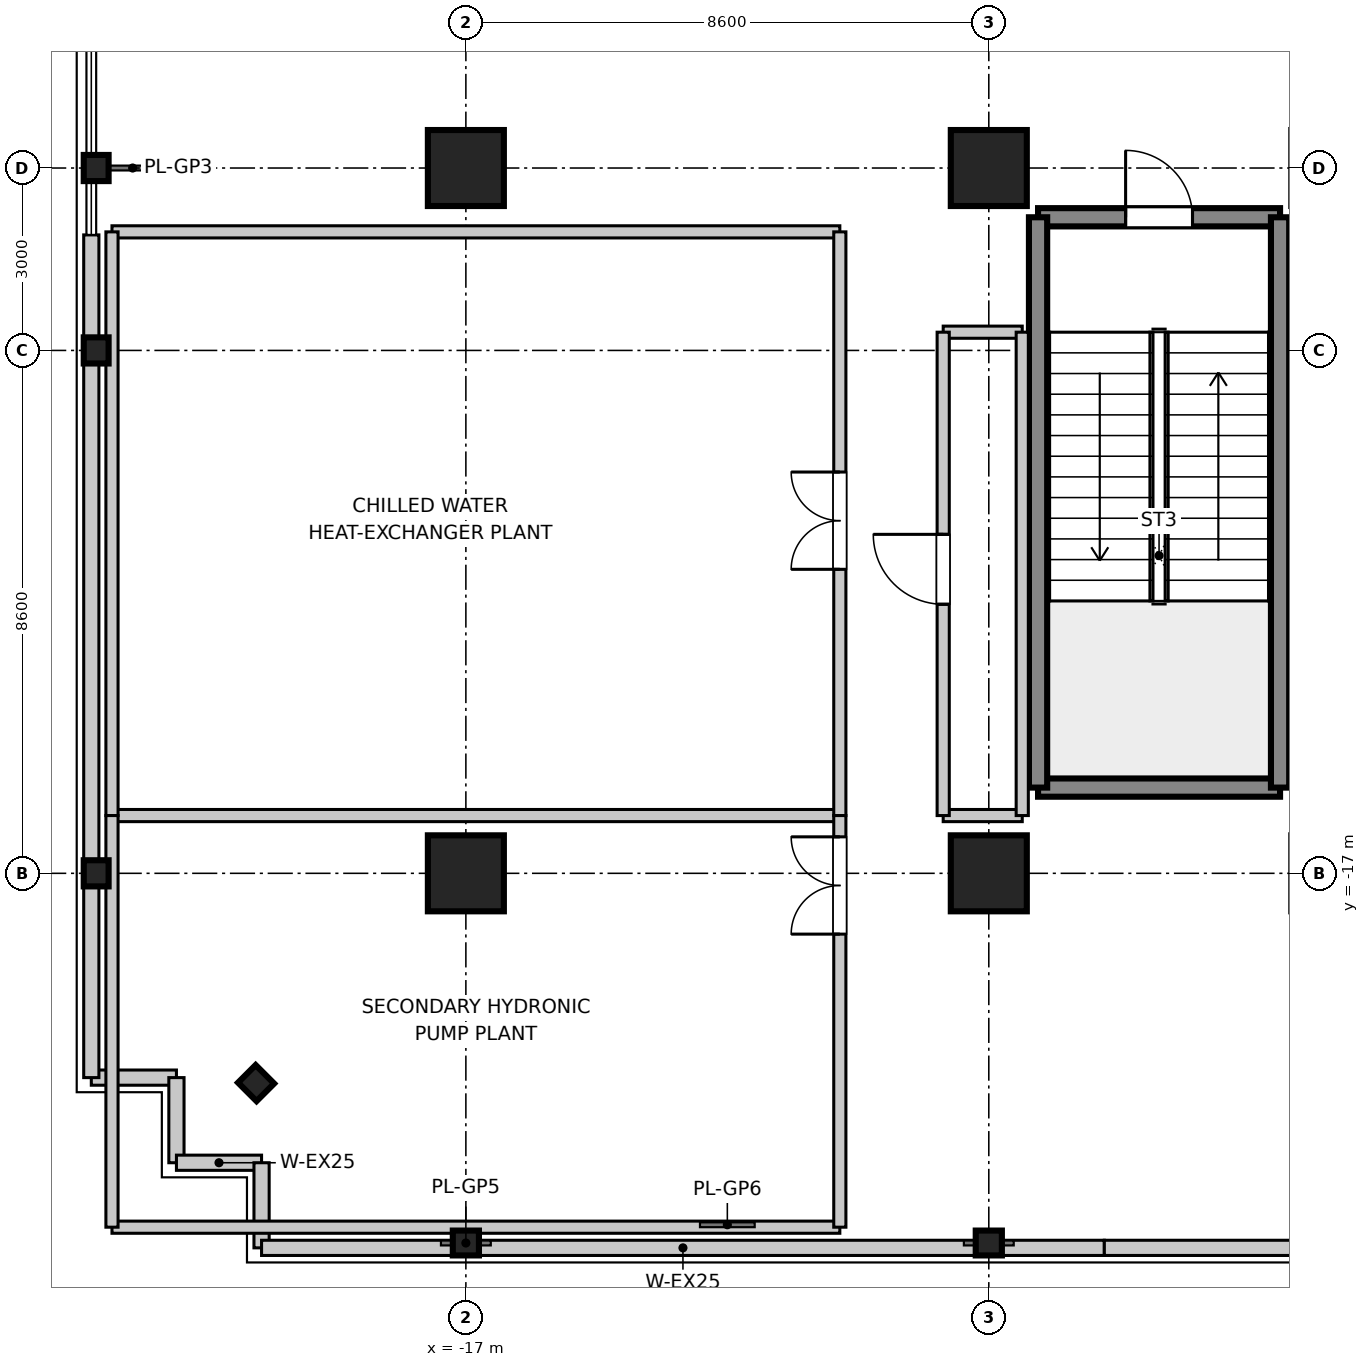
"""IFC4 building model, lengths in metres.
Left out: names, types, materials, properties, quantities, classifications, styles, units other than length and angle.
Written with IfcOpenShell. Run it as: python <this file> out.ifc"""

import sys

from ifc_helpers import new_model, si_unit, direction, frame, frame_2d, origin, origin_2d, place, context, subcontext, project, spatial, rectangle, i_section, extrude, source, transform, mapped, element, fill, save


model = new_model("IFC4")
c1 = context("Model", 3, precision=1e-05, world=origin(), true_north=direction((0.0, 1.0)))
c2 = subcontext(c1, "Body", "Model", "MODEL_VIEW")
j1 = project(units=[si_unit("LENGTHUNIT", "METRE"), si_unit("PLANEANGLEUNIT", "RADIAN")], contexts=[c1])
p1 = place(None, origin())
s1 = spatial("IfcSite", under=j1, at=p1, CompositionType="ELEMENT")
p2 = place(p1, origin())
s2 = spatial("IfcBuilding", under=s1, at=p2, CompositionType="ELEMENT")
p3 = place(p2, frame((0.0, 0.0, 144.2)))
s3 = spatial("IfcBuildingStorey", under=s2, at=p3, CompositionType="ELEMENT", Elevation=144.2)
m1 = source(origin(), c2, "Body", "SweptSolid", [
    extrude(rectangle(XDim=1.25, YDim=1.25, at=origin_2d()), origin(), (0.0, 0.0, 1.0), 4.755),
])
for number, where, z_axis, x_axis in (
    (1, (-17.0, -17.0, 0.0), (0.0, 0.0, 1.0), (1.0, 0.0, 0.0)),
    (2, (-17.0, -5.4, 0.0), (0.0, 0.0, 1.0), (1.0, 0.0, 0.0)),
    (3, (-8.4, -17.0, 0.0), (0.0, 0.0, 1.0), (1.0, 0.0, 0.0)),
    (4, (-8.4, -5.4, 0.0), (0.0, 0.0, 1.0), (1.0, 0.0, 0.0)),
):
    element("IfcColumn", number, at=place(p3, frame(where, z_axis=z_axis, x_axis=x_axis)), inside=s3, PredefinedType="COLUMN", context=c2, shape_type="MappedRepresentation", body=[
        mapped(m1, transform((0.0, 0.0, 0.0), scale=1.0)),
    ])
m2 = source(origin(), c2, "Body", "SweptSolid", [
    extrude(i_section(OverallWidth=0.409, OverallDepth=0.43, WebThickness=0.021, FlangeThickness=0.034, at=origin_2d()), origin(), (0.0, 0.0, 1.0), 4.694),
])
for number, where, z_axis, x_axis in (
    (5, (-23.08, -17.0, 0.0), (0.128, 0.0, 0.992), (0.0, 1.0, 0.0)),
    (6, (-23.08, -8.4, 0.0), (0.128, 0.0, 0.992), (0.0, 1.0, 0.0)),
    (7, (-23.08, -5.4, 0.0), (0.128, 0.0, 0.992), (0.0, 1.0, 0.0)),
    (8, (-17.0, -23.08, 0.0), (0.0, 0.128, 0.992), (0.0, -0.992, 0.128)),
    (9, (-8.4, -23.08, 0.0), (0.0, 0.128, 0.992), (0.0, -0.992, 0.128)),
):
    element("IfcColumn", number, at=place(p3, frame(where, z_axis=z_axis, x_axis=x_axis)), inside=s3, PredefinedType="COLUMN", context=c2, shape_type="MappedRepresentation", body=[
        mapped(m2, transform((0.0, 0.0, 0.0), scale=1.0)),
    ])
m3 = source(origin(), c2, "Body", "SweptSolid", [
    extrude(i_section(OverallWidth=0.409, OverallDepth=0.43, WebThickness=0.021, FlangeThickness=0.034, at=origin_2d()), origin(), (0.0, 0.0, 1.0), 4.732),
])
p4 = place(p3, frame((-20.45, -20.45, 0.0), z_axis=(0.126773471153, 0.126773471153, 0.983797222005), x_axis=(-0.991898611002, 0.008101388998, 0.126773471153)))
e10 = element("IfcColumn", 10, at=p4, inside=s3, PredefinedType="COLUMN", context=c2, shape_type="MappedRepresentation", body=[
    mapped(m3, transform((0.0, 0.0, 0.0), scale=1.0)),
])
m4 = source(origin(), c2, "Body", "SweptSolid", [
    extrude(rectangle(XDim=3.98, YDim=0.3, at=frame_2d((1.99, 0.0))), origin(), (0.0, 0.0, 1.0), 4.54),
])
p5 = place(p3, frame((-7.59, -15.59, 0.0), z_axis=(0.0, 0.0, 1.0), x_axis=(1.0, 0.0, 0.0)))
e11 = element("IfcWall", 11, at=p5, inside=s3, PredefinedType="SHEAR", context=c2, shape_type="MappedRepresentation", body=[
    mapped(m4, transform((0.0, 0.0, 0.0), scale=1.0)),
])
p6 = place(p3, frame((-7.59, -6.21, 0.0), z_axis=(0.0, 0.0, 1.0), x_axis=(1.0, 0.0, 0.0)))
e12 = element("IfcWall", 12, at=p6, inside=s3, PredefinedType="SHEAR", context=c2, shape_type="MappedRepresentation", body=[
    mapped(m4, transform((0.0, 0.0, 0.0), scale=1.0)),
])
p7 = place(p6, frame((1.44, 0.0, 0.0)))
e13 = element("IfcOpeningElement", 13, at=p7, cuts=e12, PredefinedType="OPENING", context=c2, shape_type="SweptSolid", body=[
    extrude(rectangle(XDim=1.1, YDim=2.15, at=frame_2d((0.55, 1.075))), frame((0.0, 0.16, 0.0), z_axis=(0.0, -1.0, 0.0), x_axis=(1.0, 0.0, 0.0)), (0.0, 0.0, 1.0), 0.32),
])
m5 = source(origin(), c2, "Body", "SweptSolid", [
    extrude(rectangle(XDim=9.38, YDim=0.3, at=frame_2d((4.69, 0.0))), origin(), (0.0, 0.0, 1.0), 4.54),
])
for number, where, z_axis, x_axis in (
    (14, (-7.59, -15.59, 0.0), (0.0, 0.0, 1.0), (0.0, 1.0, 0.0)),
    (15, (-3.61, -15.59, 0.0), (0.0, 0.0, 1.0), (0.0, 1.0, 0.0)),
):
    element("IfcWall", number, at=place(p3, frame(where, z_axis=z_axis, x_axis=x_axis)), inside=s3, PredefinedType="SHEAR", context=c2, shape_type="MappedRepresentation", body=[
        mapped(m5, transform((0.0, 0.0, 0.0), scale=1.0)),
    ])
m6 = source(origin(), c2, "Body", "SweptSolid", [
    extrude(rectangle(XDim=1.4, YDim=0.25, at=frame_2d((0.7, 0.0))), origin(), (0.0, 0.0, 1.0), 4.54),
])
for number, where, z_axis, x_axis in (
    (16, (-23.16, -20.36, 0.0), (0.0, 0.0, 1.0), (1.0, 0.0, 0.0)),
    (17, (-21.76, -21.76, 0.0), (0.0, 0.0, 1.0), (0.0, 1.0, 0.0)),
    (18, (-21.76, -21.76, 0.0), (0.0, 0.0, 1.0), (1.0, 0.0, 0.0)),
    (19, (-20.36, -23.16, 0.0), (0.0, 0.0, 1.0), (0.0, 1.0, 0.0)),
):
    element("IfcWall", number, at=place(p3, frame(where, z_axis=z_axis, x_axis=x_axis)), inside=s3, PredefinedType="STANDARD", context=c2, shape_type="MappedRepresentation", body=[
        mapped(m6, transform((0.0, 0.0, 0.0), scale=1.0)),
    ])
m7 = source(origin(), c2, "Body", "SweptSolid", [
    extrude(rectangle(XDim=13.86, YDim=0.25, at=frame_2d((6.93, 0.0))), origin(), (0.0, 0.0, 1.0), 4.02),
])
p8 = place(p3, frame((-20.36, -23.16, 0.0), z_axis=(0.0, 0.0, 1.0), x_axis=(1.0, 0.0, 0.0)))
e20 = element("IfcWall", 20, at=p8, inside=s3, PredefinedType="STANDARD", context=c2, shape_type="MappedRepresentation", body=[
    mapped(m7, transform((0.0, 0.0, 0.0), scale=1.0)),
])
m8 = source(origin(), c2, "Body", "SweptSolid", [
    extrude(rectangle(XDim=13.0, YDim=0.25, at=frame_2d((6.5, 0.0))), origin(), (0.0, 0.0, 1.0), 4.02),
])
p9 = place(p3, frame((-6.5, -23.16, 0.0), z_axis=(0.0, 0.0, 1.0), x_axis=(1.0, 0.0, 0.0)))
e21 = element("IfcWall", 21, at=p9, inside=s3, PredefinedType="STANDARD", context=c2, shape_type="MappedRepresentation", body=[
    mapped(m8, transform((0.0, 0.0, 0.0), scale=1.0)),
])
p10 = place(p3, frame((-23.16, -20.36, 0.0), z_axis=(0.0, 0.0, 1.0), x_axis=(0.0, 1.0, 0.0)))
e22 = element("IfcWall", 22, at=p10, inside=s3, PredefinedType="STANDARD", context=c2, shape_type="MappedRepresentation", body=[
    mapped(m7, transform((0.0, 0.0, 0.0), scale=1.0)),
])
m9 = source(origin(), c2, "Body", "SweptSolid", [
    extrude(rectangle(XDim=1.3, YDim=0.2, at=frame_2d((0.65, 0.0))), origin(), (0.0, 0.0, 1.0), 3.4),
])
for number, where, z_axis, x_axis in (
    (23, (-9.15, -16.05, 0.0), (0.0, 0.0, 1.0), (1.0, 0.0, 0.0)),
    (24, (-9.15, -8.1, 0.0), (0.0, 0.0, 1.0), (1.0, 0.0, 0.0)),
):
    element("IfcWall", number, at=place(p3, frame(where, z_axis=z_axis, x_axis=x_axis)), inside=s3, PredefinedType="PARTITIONING", context=c2, shape_type="MappedRepresentation", body=[
        mapped(m9, transform((0.0, 0.0, 0.0), scale=1.0)),
    ])
m10 = source(origin(), c2, "Body", "SweptSolid", [
    extrude(rectangle(XDim=7.95, YDim=0.2, at=frame_2d((3.975, 0.0))), origin(), (0.0, 0.0, 1.0), 3.4),
])
p11 = place(p3, frame((-9.15, -16.05, 0.0), z_axis=(0.0, 0.0, 1.0), x_axis=(0.0, 1.0, 0.0)))
e25 = element("IfcWall", 25, at=p11, inside=s3, PredefinedType="PARTITIONING", context=c2, shape_type="MappedRepresentation", body=[
    mapped(m10, transform((0.0, 0.0, 0.0), scale=1.0)),
])
p12 = place(p11, frame((3.475, 0.0, 0.0)))
e26 = element("IfcOpeningElement", 26, at=p12, cuts=e25, PredefinedType="OPENING", context=c2, shape_type="SweptSolid", body=[
    extrude(rectangle(XDim=1.15, YDim=2.15, at=frame_2d((0.575, 1.075))), frame((0.0, 0.11, 0.0), z_axis=(0.0, -1.0, 0.0), x_axis=(1.0, 0.0, 0.0)), (0.0, 0.0, 1.0), 0.22),
])
p13 = place(p3, frame((-7.85, -16.05, 0.0), z_axis=(0.0, 0.0, 1.0), x_axis=(0.0, 1.0, 0.0)))
e27 = element("IfcWall", 27, at=p13, inside=s3, PredefinedType="PARTITIONING", context=c2, shape_type="MappedRepresentation", body=[
    mapped(m10, transform((0.0, 0.0, 0.0), scale=1.0)),
])
m11 = source(origin(), c2, "Body", "SweptSolid", [
    extrude(rectangle(XDim=11.97, YDim=0.2, at=frame_2d((5.985, 0.0))), origin(), (0.0, 0.0, 1.0), 3.4),
])
for number, where, z_axis, x_axis in (
    (28, (-22.82, -16.05, 0.0), (0.0, 0.0, 1.0), (1.0, 0.0, 0.0)),
    (29, (-22.82, -6.45, 0.0), (0.0, 0.0, 1.0), (1.0, 0.0, 0.0)),
):
    element("IfcWall", number, at=place(p3, frame(where, z_axis=z_axis, x_axis=x_axis)), inside=s3, PredefinedType="PARTITIONING", context=c2, shape_type="MappedRepresentation", body=[
        mapped(m11, transform((0.0, 0.0, 0.0), scale=1.0)),
    ])
m12 = source(origin(), c2, "Body", "SweptSolid", [
    extrude(rectangle(XDim=9.6, YDim=0.2, at=frame_2d((4.8, 0.0))), origin(), (0.0, 0.0, 1.0), 3.4),
])
p14 = place(p3, frame((-22.82, -16.05, 0.0), z_axis=(0.0, 0.0, 1.0), x_axis=(0.0, 1.0, 0.0)))
e30 = element("IfcWall", 30, at=p14, inside=s3, PredefinedType="PARTITIONING", context=c2, shape_type="MappedRepresentation", body=[
    mapped(m12, transform((0.0, 0.0, 0.0), scale=1.0)),
])
p15 = place(p3, frame((-10.85, -16.05, 0.0), z_axis=(0.0, 0.0, 1.0), x_axis=(0.0, 1.0, 0.0)))
e31 = element("IfcWall", 31, at=p15, inside=s3, PredefinedType="PARTITIONING", context=c2, shape_type="MappedRepresentation", body=[
    mapped(m12, transform((0.0, 0.0, 0.0), scale=1.0)),
])
p16 = place(p15, frame((4.05, 0.0, 0.0)))
e32 = element("IfcOpeningElement", 32, at=p16, cuts=e31, PredefinedType="OPENING", context=c2, shape_type="SweptSolid", body=[
    extrude(rectangle(XDim=1.6, YDim=2.15, at=frame_2d((0.8, 1.075))), frame((0.0, 0.11, 0.0), z_axis=(0.0, -1.0, 0.0), x_axis=(1.0, 0.0, 0.0)), (0.0, 0.0, 1.0), 0.22),
])
p17 = place(p3, frame((-22.82, -22.82, 0.0), z_axis=(0.0, 0.0, 1.0), x_axis=(1.0, 0.0, 0.0)))
e33 = element("IfcWall", 33, at=p17, inside=s3, PredefinedType="PARTITIONING", context=c2, shape_type="MappedRepresentation", body=[
    mapped(m11, transform((0.0, 0.0, 0.0), scale=1.0)),
])
m13 = source(origin(), c2, "Body", "SweptSolid", [
    extrude(rectangle(XDim=6.77, YDim=0.2, at=frame_2d((3.385, 0.0))), origin(), (0.0, 0.0, 1.0), 3.4),
])
p18 = place(p3, frame((-22.82, -22.82, 0.0), z_axis=(0.0, 0.0, 1.0), x_axis=(0.0, 1.0, 0.0)))
e34 = element("IfcWall", 34, at=p18, inside=s3, PredefinedType="PARTITIONING", context=c2, shape_type="MappedRepresentation", body=[
    mapped(m13, transform((0.0, 0.0, 0.0), scale=1.0)),
])
p19 = place(p3, frame((-10.85, -22.82, 0.0), z_axis=(0.0, 0.0, 1.0), x_axis=(0.0, 1.0, 0.0)))
e35 = element("IfcWall", 35, at=p19, inside=s3, PredefinedType="PARTITIONING", context=c2, shape_type="MappedRepresentation", body=[
    mapped(m13, transform((0.0, 0.0, 0.0), scale=1.0)),
])
p20 = place(p19, frame((4.82, 0.0, 0.0)))
e36 = element("IfcOpeningElement", 36, at=p20, cuts=e35, PredefinedType="OPENING", context=c2, shape_type="SweptSolid", body=[
    extrude(rectangle(XDim=1.6, YDim=2.15, at=frame_2d((0.8, 1.075))), frame((0.0, 0.11, 0.0), z_axis=(0.0, -1.0, 0.0), x_axis=(1.0, 0.0, 0.0)), (0.0, 0.0, 1.0), 0.22),
])
m14 = source(origin(), c2, "Body", "SweptSolid", [
    extrude(rectangle(XDim=1.1, YDim=2.15, at=frame_2d((0.55, 1.075))), frame((0.0, 0.025, 0.0), z_axis=(0.0, -1.0, 0.0), x_axis=(1.0, 0.0, 0.0)), (0.0, 0.0, 1.0), 0.05),
])
p21 = place(p7, frame((1.1, 0.0, 0.0), z_axis=(0.0, 0.0, 1.0), x_axis=(-1.0, 0.0, 0.0)))
e37 = element("IfcDoor", 37, at=p21, inside=s3, OperationType="SINGLE_SWING_LEFT", PredefinedType="DOOR", context=c2, shape_type="MappedRepresentation", body=[
    mapped(m14, transform((0.0, 0.0, 0.0), scale=1.0)),
])
fill(e13, e37)
m15 = source(origin(), c2, "Body", "SweptSolid", [
    extrude(rectangle(XDim=1.15, YDim=2.15, at=frame_2d((0.575, 1.075))), frame((0.0, 0.025, 0.0), z_axis=(0.0, -1.0, 0.0), x_axis=(1.0, 0.0, 0.0)), (0.0, 0.0, 1.0), 0.05),
])
p22 = place(p12, frame((1.15, 0.0, 0.0), z_axis=(0.0, 0.0, 1.0), x_axis=(-1.0, 0.0, 0.0)))
e38 = element("IfcDoor", 38, at=p22, inside=s3, OperationType="SINGLE_SWING_RIGHT", PredefinedType="DOOR", context=c2, shape_type="MappedRepresentation", body=[
    mapped(m15, transform((0.0, 0.0, 0.0), scale=1.0)),
])
fill(e26, e38)
m16 = source(origin(), c2, "Body", "SweptSolid", [
    extrude(rectangle(XDim=1.6, YDim=2.15, at=frame_2d((0.8, 1.075))), frame((0.0, 0.025, 0.0), z_axis=(0.0, -1.0, 0.0), x_axis=(1.0, 0.0, 0.0)), (0.0, 0.0, 1.0), 0.05),
])
p23 = place(p16, origin())
e39 = element("IfcDoor", 39, at=p23, inside=s3, OperationType="DOUBLE_DOOR_SINGLE_SWING", PredefinedType="DOOR", context=c2, shape_type="MappedRepresentation", body=[
    mapped(m16, transform((0.0, 0.0, 0.0), scale=1.0)),
])
fill(e32, e39)
p24 = place(p20, origin())
e40 = element("IfcDoor", 40, at=p24, inside=s3, OperationType="DOUBLE_DOOR_SINGLE_SWING", PredefinedType="DOOR", context=c2, shape_type="MappedRepresentation", body=[
    mapped(m16, transform((0.0, 0.0, 0.0), scale=1.0)),
])
fill(e36, e40)
save(model, sys.argv[1])
